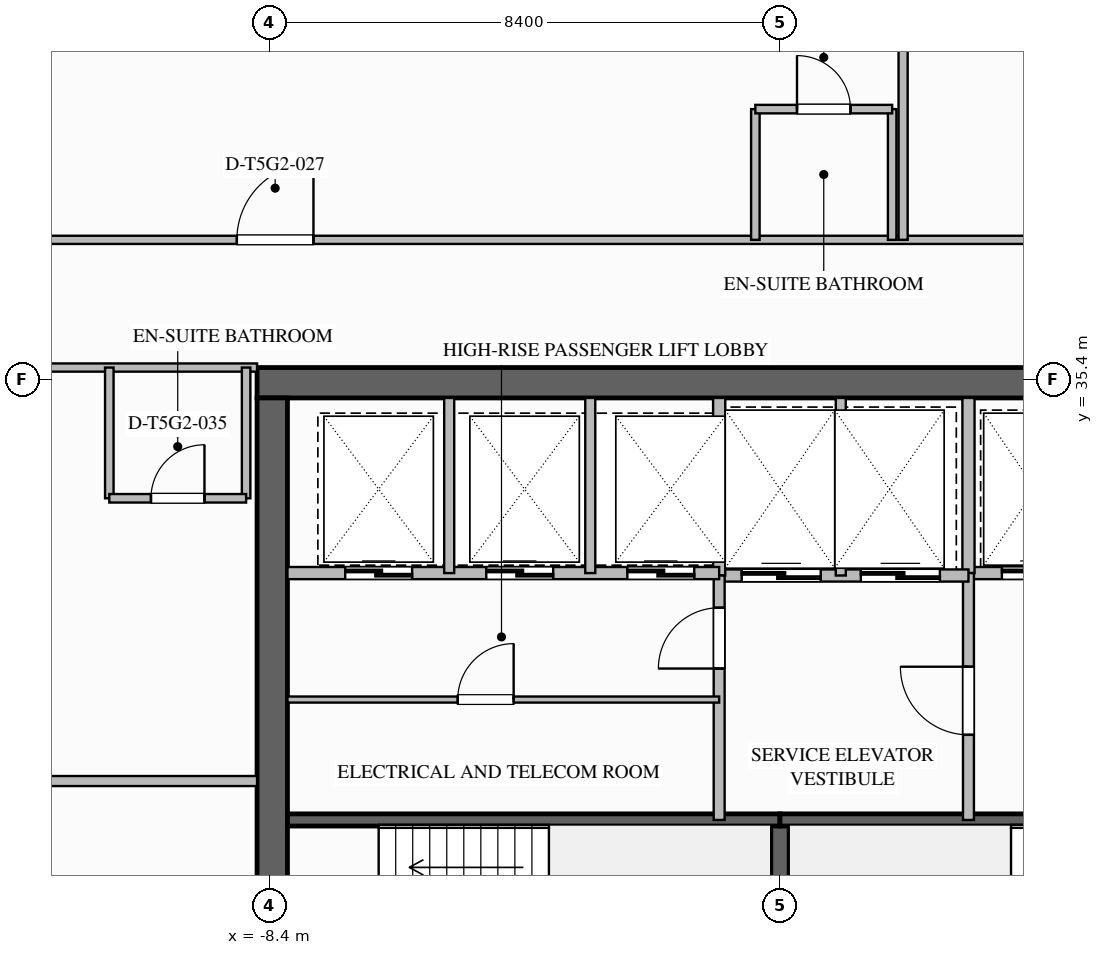
"""IFC4 building model, lengths in metres.
Left out: names, types, materials, properties, quantities, classifications, styles, units other than length and angle.
Written with IfcOpenShell. Run it as: python <this file> out.ifc"""

import sys

from ifc_helpers import new_model, si_unit, direction, frame, frame_2d, origin, place, context, subcontext, project, spatial, rectangle, extrude, element, fill, save


model = new_model("IFC4")
c1 = context("Model", 3, precision=1e-05, world=origin(), true_north=direction((0.0, 1.0)))
c2 = subcontext(c1, "Body", "Model", "MODEL_VIEW")
j1 = project(units=[si_unit("LENGTHUNIT", "METRE"), si_unit("PLANEANGLEUNIT", "RADIAN")], contexts=[c1])
p1 = place(None, origin())
s1 = spatial("IfcSite", under=j1, at=p1, CompositionType="ELEMENT")
p2 = place(p1, origin())
s2 = spatial("IfcBuilding", under=s1, at=p2, CompositionType="ELEMENT")
p3 = place(p2, frame((0.0, 0.0, 275.95)))
s3 = spatial("IfcBuildingStorey", under=s2, at=p3, CompositionType="ELEMENT", Elevation=275.95)
p4 = place(p3, frame((-8.6, 35.35, 0.0), z_axis=(0.0, 0.0, 1.0), x_axis=(1.0, 0.0, 0.0)))
e1 = element("IfcWall", 1, at=p4, inside=s3, PredefinedType="SHEAR", context=c2, shape_type="SweptSolid", body=[
    extrude(rectangle(XDim=17.2, YDim=0.5, at=frame_2d((8.6, 0.0))), origin(), (0.0, 0.0, 1.0), 3.65),
])
p5 = place(p3, frame((-8.35, 18.9, 0.0), z_axis=(0.0, 0.0, 1.0), x_axis=(0.0, 1.0, 0.0)))
e2 = element("IfcWall", 2, at=p5, inside=s3, PredefinedType="SHEAR", context=c2, shape_type="SweptSolid", body=[
    extrude(rectangle(XDim=16.2, YDim=0.5, at=frame_2d((8.1, 0.0))), origin(), (0.0, 0.0, 1.0), 3.65),
])
p6 = place(p3, frame((0.0, 25.04, 0.0), z_axis=(0.0, 0.0, 1.0), x_axis=(0.0, 1.0, 0.0)))
e3 = element("IfcWall", 3, at=p6, inside=s3, PredefinedType="SOLIDWALL", context=c2, shape_type="SweptSolid", body=[
    extrude(rectangle(XDim=3.12, YDim=0.3, at=frame_2d((1.56, 0.0))), origin(), (0.0, 0.0, 1.0), 3.39),
])
p7 = place(p3, frame((-8.1, 28.16, 0.0), z_axis=(0.0, 0.0, 1.0), x_axis=(1.0, 0.0, 0.0)))
e4 = element("IfcWall", 4, at=p7, inside=s3, PredefinedType="SOLIDWALL", context=c2, shape_type="SweptSolid", body=[
    extrude(rectangle(XDim=8.1, YDim=0.2, at=frame_2d((4.05, 0.0))), origin(), (0.0, 0.0, 1.0), 3.39),
])
p8 = place(p3, frame((8.1, 28.16, 0.0), z_axis=(0.0, 0.0, 1.0), x_axis=(-1.0, 0.0, 0.0)))
e5 = element("IfcWall", 5, at=p8, inside=s3, PredefinedType="SOLIDWALL", context=c2, shape_type="SweptSolid", body=[
    extrude(rectangle(XDim=8.1, YDim=0.2, at=frame_2d((4.05, 0.0))), origin(), (0.0, 0.0, 1.0), 3.39),
])
p9 = place(p8, frame((0.28, 0.0, 0.0)))
e6 = element("IfcOpeningElement", 6, at=p9, cuts=e5, PredefinedType="OPENING", context=c2, shape_type="SweptSolid", body=[
    extrude(rectangle(XDim=1.05, YDim=2.1, at=frame_2d((0.525, 1.05))), frame((0.0, 0.11, 0.0), z_axis=(0.0, -1.0, 0.0), x_axis=(1.0, 0.0, 0.0)), (0.0, 0.0, 1.0), 0.22),
])
p10 = place(p3, frame((3.1, 32.22, 0.0), z_axis=(0.0, 0.0, 1.0), x_axis=(1.0, 0.0, 0.0)))
e7 = element("IfcWall", 7, at=p10, inside=s3, PredefinedType="SOLIDWALL", context=c2, shape_type="SweptSolid", body=[
    extrude(rectangle(XDim=5.0, YDim=0.2, at=frame_2d((2.5, 0.0))), origin(), (0.0, 0.0, 1.0), 3.39),
])
p11 = place(p10, frame((0.55, 0.0, 0.0)))
e8 = element("IfcOpeningElement", 8, at=p11, cuts=e7, PredefinedType="OPENING", context=c2, shape_type="SweptSolid", body=[
    extrude(rectangle(XDim=1.2, YDim=2.2, at=frame_2d((0.6, 1.1))), frame((0.0, 0.11, 0.0), z_axis=(0.0, -1.0, 0.0), x_axis=(1.0, 0.0, 0.0)), (0.0, 0.0, 1.0), 0.22),
])
p12 = place(p10, frame((2.85, 0.0, 0.0)))
e9 = element("IfcOpeningElement", 9, at=p12, cuts=e7, PredefinedType="OPENING", context=c2, shape_type="SweptSolid", body=[
    extrude(rectangle(XDim=1.2, YDim=2.2, at=frame_2d((0.6, 1.1))), frame((0.0, 0.11, 0.0), z_axis=(0.0, -1.0, 0.0), x_axis=(1.0, 0.0, 0.0)), (0.0, 0.0, 1.0), 0.22),
])
p13 = place(p3, frame((3.1, 32.22, 0.0), z_axis=(0.0, 0.0, 1.0), x_axis=(0.0, 1.0, 0.0)))
e10 = element("IfcWall", 10, at=p13, inside=s3, PredefinedType="SOLIDWALL", context=c2, shape_type="SweptSolid", body=[
    extrude(rectangle(XDim=2.88, YDim=0.2, at=frame_2d((1.44, 0.0))), origin(), (0.0, 0.0, 1.0), 3.39),
])
p14 = place(p3, frame((3.1, 28.16, 0.0), z_axis=(0.0, 0.0, 1.0), x_axis=(0.0, 1.0, 0.0)))
e11 = element("IfcWall", 11, at=p14, inside=s3, PredefinedType="SOLIDWALL", context=c2, shape_type="SweptSolid", body=[
    extrude(rectangle(XDim=4.06, YDim=0.18, at=frame_2d((2.03, 0.0))), origin(), (0.0, 0.0, 1.0), 3.39),
])
p15 = place(p14, frame((1.4, 0.0, 0.0)))
e12 = element("IfcOpeningElement", 12, at=p15, cuts=e11, PredefinedType="OPENING", context=c2, shape_type="SweptSolid", body=[
    extrude(rectangle(XDim=1.12, YDim=2.1, at=frame_2d((0.56, 1.05))), frame((0.0, 0.1, 0.0), z_axis=(0.0, -1.0, 0.0), x_axis=(1.0, 0.0, 0.0)), (0.0, 0.0, 1.0), 0.2),
])
p16 = place(p3, frame((-1.0, 32.18, 0.0), z_axis=(0.0, 0.0, 1.0), x_axis=(1.0, 0.0, 0.0)))
e13 = element("IfcWall", 13, at=p16, inside=s3, PredefinedType="SOLIDWALL", context=c2, shape_type="SweptSolid", body=[
    extrude(rectangle(XDim=4.1, YDim=0.2, at=frame_2d((2.05, 0.0))), origin(), (0.0, 0.0, 1.0), 3.39),
])
p17 = place(p16, frame((0.37, 0.0, 0.0)))
e14 = element("IfcOpeningElement", 14, at=p17, cuts=e13, PredefinedType="OPENING", context=c2, shape_type="SweptSolid", body=[
    extrude(rectangle(XDim=1.3, YDim=2.2, at=frame_2d((0.65, 1.1))), frame((0.0, 0.11, 0.0), z_axis=(0.0, -1.0, 0.0), x_axis=(1.0, 0.0, 0.0)), (0.0, 0.0, 1.0), 0.22),
])
p18 = place(p16, frame((2.33, 0.0, 0.0)))
e15 = element("IfcOpeningElement", 15, at=p18, cuts=e13, PredefinedType="OPENING", context=c2, shape_type="SweptSolid", body=[
    extrude(rectangle(XDim=1.3, YDim=2.2, at=frame_2d((0.65, 1.1))), frame((0.0, 0.11, 0.0), z_axis=(0.0, -1.0, 0.0), x_axis=(1.0, 0.0, 0.0)), (0.0, 0.0, 1.0), 0.22),
])
p19 = place(p3, frame((-1.0, 32.18, 0.0), z_axis=(0.0, 0.0, 1.0), x_axis=(0.0, 1.0, 0.0)))
e16 = element("IfcWall", 16, at=p19, inside=s3, PredefinedType="SOLIDWALL", context=c2, shape_type="SweptSolid", body=[
    extrude(rectangle(XDim=2.92, YDim=0.2, at=frame_2d((1.46, 0.0))), origin(), (0.0, 0.0, 1.0), 3.39),
])
p20 = place(p3, frame((1.0, 32.18, 0.0), z_axis=(0.0, 0.0, 1.0), x_axis=(0.0, 1.0, 0.0)))
e17 = element("IfcWall", 17, at=p20, inside=s3, PredefinedType="PARTITIONING", context=c2, shape_type="SweptSolid", body=[
    extrude(rectangle(XDim=2.92, YDim=0.165, at=frame_2d((1.46, 0.0))), origin(), (0.0, 0.0, 1.0), 3.39),
])
p21 = place(p3, frame((-1.0, 28.16, 0.0), z_axis=(0.0, 0.0, 1.0), x_axis=(0.0, 1.0, 0.0)))
e18 = element("IfcWall", 18, at=p21, inside=s3, PredefinedType="SOLIDWALL", context=c2, shape_type="SweptSolid", body=[
    extrude(rectangle(XDim=4.02, YDim=0.18, at=frame_2d((2.01, 0.0))), origin(), (0.0, 0.0, 1.0), 3.39),
])
p22 = place(p21, frame((2.49, 0.0, 0.0)))
e19 = element("IfcOpeningElement", 19, at=p22, cuts=e18, PredefinedType="OPENING", context=c2, shape_type="SweptSolid", body=[
    extrude(rectangle(XDim=1.0, YDim=2.1, at=frame_2d((0.5, 1.05))), frame((0.0, 0.1, 0.0), z_axis=(0.0, -1.0, 0.0), x_axis=(1.0, 0.0, 0.0)), (0.0, 0.0, 1.0), 0.2),
])
p23 = place(p3, frame((-8.1, 32.22, 0.0), z_axis=(0.0, 0.0, 1.0), x_axis=(1.0, 0.0, 0.0)))
e20 = element("IfcWall", 20, at=p23, inside=s3, PredefinedType="SOLIDWALL", context=c2, shape_type="SweptSolid", body=[
    extrude(rectangle(XDim=7.1, YDim=0.2, at=frame_2d((3.55, 0.0))), origin(), (0.0, 0.0, 1.0), 3.39),
])
p24 = place(p23, frame((0.95, 0.0, 0.0)))
e21 = element("IfcOpeningElement", 21, at=p24, cuts=e20, PredefinedType="OPENING", context=c2, shape_type="SweptSolid", body=[
    extrude(rectangle(XDim=1.1, YDim=2.2, at=frame_2d((0.55, 1.1))), frame((0.0, 0.11, 0.0), z_axis=(0.0, -1.0, 0.0), x_axis=(1.0, 0.0, 0.0)), (0.0, 0.0, 1.0), 0.22),
])
p25 = place(p23, frame((3.27, 0.0, 0.0)))
e22 = element("IfcOpeningElement", 22, at=p25, cuts=e20, PredefinedType="OPENING", context=c2, shape_type="SweptSolid", body=[
    extrude(rectangle(XDim=1.1, YDim=2.2, at=frame_2d((0.55, 1.1))), frame((0.0, 0.11, 0.0), z_axis=(0.0, -1.0, 0.0), x_axis=(1.0, 0.0, 0.0)), (0.0, 0.0, 1.0), 0.22),
])
p26 = place(p23, frame((5.59, 0.0, 0.0)))
e23 = element("IfcOpeningElement", 23, at=p26, cuts=e20, PredefinedType="OPENING", context=c2, shape_type="SweptSolid", body=[
    extrude(rectangle(XDim=1.1, YDim=2.2, at=frame_2d((0.55, 1.1))), frame((0.0, 0.11, 0.0), z_axis=(0.0, -1.0, 0.0), x_axis=(1.0, 0.0, 0.0)), (0.0, 0.0, 1.0), 0.22),
])
for number, where, z_axis, x_axis in (
    (24, (-5.44, 32.22, 0.0), (0.0, 0.0, 1.0), (0.0, 1.0, 0.0)),
    (25, (-3.12, 32.22, 0.0), (0.0, 0.0, 1.0), (0.0, 1.0, 0.0)),
):
    element("IfcWall", number, at=place(p3, frame(where, z_axis=z_axis, x_axis=x_axis)), inside=s3, PredefinedType="PARTITIONING", context=c2, shape_type="SweptSolid", body=[
        extrude(rectangle(XDim=2.88, YDim=0.165, at=frame_2d((1.44, 0.0))), origin(), (0.0, 0.0, 1.0), 3.39),
    ])
p27 = place(p3, frame((-8.1, 30.14, 0.0), z_axis=(0.0, 0.0, 1.0), x_axis=(1.0, 0.0, 0.0)))
e26 = element("IfcWall", 26, at=p27, inside=s3, PredefinedType="PARTITIONING", context=c2, shape_type="SweptSolid", body=[
    extrude(rectangle(XDim=7.1, YDim=0.1, at=frame_2d((3.55, 0.0))), origin(), (0.0, 0.0, 1.0), 3.39),
])
p28 = place(p27, frame((2.8, 0.0, 0.0)))
e27 = element("IfcOpeningElement", 27, at=p28, cuts=e26, PredefinedType="OPENING", context=c2, shape_type="SweptSolid", body=[
    extrude(rectangle(XDim=0.92, YDim=2.1, at=frame_2d((0.46, 1.05))), frame((0.0, 0.06, 0.0), z_axis=(0.0, -1.0, 0.0), x_axis=(1.0, 0.0, 0.0)), (0.0, 0.0, 1.0), 0.12),
])
p29 = place(p3, frame((-16.2, 37.7, 0.0), z_axis=(0.0, 0.0, 1.0), x_axis=(1.0, 0.0, 0.0)))
e28 = element("IfcWall", 28, at=p29, inside=s3, PredefinedType="PARTITIONING", context=c2, shape_type="SweptSolid", body=[
    extrude(rectangle(XDim=38.28, YDim=0.135, at=frame_2d((19.14, 0.0))), origin(), (0.0, 0.0, 1.0), 3.39),
])
p30 = place(p29, frame((33.355, 0.0, 0.0)))
e29 = element("IfcOpeningElement", 29, at=p30, cuts=e28, PredefinedType="OPENING", context=c2, shape_type="SweptSolid", body=[
    extrude(rectangle(XDim=1.26, YDim=2.2, at=frame_2d((0.63, 1.1))), frame((0.0, 0.077, 0.0), z_axis=(0.0, -1.0, 0.0), x_axis=(1.0, 0.0, 0.0)), (0.0, 0.0, 1.0), 0.155),
])
p31 = place(p29, frame((7.268, 0.0, 0.0)))
e30 = element("IfcOpeningElement", 30, at=p31, cuts=e28, PredefinedType="OPENING", context=c2, shape_type="SweptSolid", body=[
    extrude(rectangle(XDim=1.26, YDim=2.2, at=frame_2d((0.63, 1.1))), frame((0.0, 0.077, 0.0), z_axis=(0.0, -1.0, 0.0), x_axis=(1.0, 0.0, 0.0)), (0.0, 0.0, 1.0), 0.155),
])
p32 = place(p29, frame((23.468, 0.0, 0.0)))
e31 = element("IfcOpeningElement", 31, at=p32, cuts=e28, PredefinedType="OPENING", context=c2, shape_type="SweptSolid", body=[
    extrude(rectangle(XDim=1.26, YDim=2.2, at=frame_2d((0.63, 1.1))), frame((0.0, 0.077, 0.0), z_axis=(0.0, -1.0, 0.0), x_axis=(1.0, 0.0, 0.0)), (0.0, 0.0, 1.0), 0.155),
])
p33 = place(p3, frame((-16.2, 35.6, 0.0), z_axis=(0.0, 0.0, 1.0), x_axis=(1.0, 0.0, 0.0)))
e32 = element("IfcWall", 32, at=p33, inside=s3, PredefinedType="PARTITIONING", context=c2, shape_type="SweptSolid", body=[
    extrude(rectangle(XDim=7.6, YDim=0.135, at=frame_2d((3.8, 0.0))), origin(), (0.0, 0.0, 1.0), 2.767),
])
p34 = place(p33, frame((2.155, 0.0, 0.0)))
e33 = element("IfcOpeningElement", 33, at=p34, cuts=e32, PredefinedType="OPENING", context=c2, shape_type="SweptSolid", body=[
    extrude(rectangle(XDim=1.26, YDim=2.2, at=frame_2d((0.63, 1.1))), frame((0.0, 0.077, 0.0), z_axis=(0.0, -1.0, 0.0), x_axis=(1.0, 0.0, 0.0)), (0.0, 0.0, 1.0), 0.155),
])
for number, where, z_axis, x_axis in (
    (34, (-0.405, 37.7, 0.0), (0.0, 0.0, 1.0), (0.0, 1.0, 0.0)),
    (35, (1.845, 37.7, 0.0), (0.0, 0.0, 1.0), (0.0, 1.0, 0.0)),
):
    element("IfcWall", number, at=place(p3, frame(where, z_axis=z_axis, x_axis=x_axis)), inside=s3, PredefinedType="PLUMBINGWALL", context=c2, shape_type="SweptSolid", body=[
        extrude(rectangle(XDim=2.15, YDim=0.14, at=frame_2d((1.075, 0.0))), origin(), (0.0, 0.0, 1.0), 3.39),
    ])
p35 = place(p3, frame((-0.405, 39.85, 0.0), z_axis=(0.0, 0.0, 1.0), x_axis=(1.0, 0.0, 0.0)))
e36 = element("IfcWall", 36, at=p35, inside=s3, PredefinedType="PLUMBINGWALL", context=c2, shape_type="SweptSolid", body=[
    extrude(rectangle(XDim=2.25, YDim=0.14, at=frame_2d((1.125, 0.0))), origin(), (0.0, 0.0, 1.0), 3.39),
])
p36 = place(p35, frame((0.685, 0.0, 0.0)))
e37 = element("IfcOpeningElement", 37, at=p36, cuts=e36, PredefinedType="OPENING", context=c2, shape_type="SweptSolid", body=[
    extrude(rectangle(XDim=0.88, YDim=2.1, at=frame_2d((0.44, 1.05))), frame((0.0, 0.08, 0.0), z_axis=(0.0, -1.0, 0.0), x_axis=(1.0, 0.0, 0.0)), (0.0, 0.0, 1.0), 0.16),
])
p37 = place(p3, frame((2.025, 37.7, 0.0), z_axis=(0.0, 0.0, 1.0), x_axis=(0.0, 1.0, 0.0)))
e38 = element("IfcWall", 38, at=p37, inside=s3, PredefinedType="PARTITIONING", context=c2, shape_type="SweptSolid", body=[
    extrude(rectangle(XDim=10.7, YDim=0.15, at=frame_2d((5.35, 0.0))), origin(), (0.0, 0.0, 1.0), 3.39),
])
p38 = place(p3, frame((-21.4, 28.8, 0.0), z_axis=(0.0, 0.0, 1.0), x_axis=(1.0, 0.0, 0.0)))
e39 = element("IfcWall", 39, at=p38, inside=s3, PredefinedType="PARTITIONING", context=c2, shape_type="SweptSolid", body=[
    extrude(rectangle(XDim=12.8, YDim=0.165, at=frame_2d((6.4, 0.0))), origin(), (0.0, 0.0, 1.0), 3.39),
])
for number, where, z_axis, x_axis in (
    (40, (-11.03, 35.6, 0.0), (0.0, 0.0, 1.0), (0.0, -1.0, 0.0)),
    (41, (-8.78, 35.6, 0.0), (0.0, 0.0, 1.0), (0.0, -1.0, 0.0)),
):
    element("IfcWall", number, at=place(p3, frame(where, z_axis=z_axis, x_axis=x_axis)), inside=s3, PredefinedType="PLUMBINGWALL", context=c2, shape_type="SweptSolid", body=[
        extrude(rectangle(XDim=2.15, YDim=0.14, at=frame_2d((1.075, 0.0))), origin(), (0.0, 0.0, 1.0), 3.39),
    ])
p39 = place(p3, frame((-11.03, 33.45, 0.0), z_axis=(0.0, 0.0, 1.0), x_axis=(1.0, 0.0, 0.0)))
e42 = element("IfcWall", 42, at=p39, inside=s3, PredefinedType="PLUMBINGWALL", context=c2, shape_type="SweptSolid", body=[
    extrude(rectangle(XDim=2.25, YDim=0.14, at=frame_2d((1.125, 0.0))), origin(), (0.0, 0.0, 1.0), 3.39),
])
p40 = place(p39, frame((0.685, 0.0, 0.0)))
e43 = element("IfcOpeningElement", 43, at=p40, cuts=e42, PredefinedType="OPENING", context=c2, shape_type="SweptSolid", body=[
    extrude(rectangle(XDim=0.88, YDim=2.1, at=frame_2d((0.44, 1.05))), frame((0.0, 0.08, 0.0), z_axis=(0.0, -1.0, 0.0), x_axis=(1.0, 0.0, 0.0)), (0.0, 0.0, 1.0), 0.16),
])
p41 = place(p11, origin())
e44 = element("IfcDoor", 44, at=p41, inside=s3, OperationType="SLIDING_TO_LEFT", PredefinedType="DOOR", context=c2, shape_type="SweptSolid", body=[
    extrude(rectangle(XDim=1.2, YDim=2.2, at=frame_2d((0.6, 1.1))), frame((0.0, 0.025, 0.0), z_axis=(0.0, -1.0, 0.0), x_axis=(1.0, 0.0, 0.0)), (0.0, 0.0, 1.0), 0.05),
])
fill(e8, e44)
p42 = place(p15, origin())
e45 = element("IfcDoor", 45, at=p42, inside=s3, OperationType="SINGLE_SWING_RIGHT", PredefinedType="DOOR", context=c2, shape_type="SweptSolid", body=[
    extrude(rectangle(XDim=1.12, YDim=2.1, at=frame_2d((0.56, 1.05))), frame((0.0, 0.025, 0.0), z_axis=(0.0, -1.0, 0.0), x_axis=(1.0, 0.0, 0.0)), (0.0, 0.0, 1.0), 0.05),
])
fill(e12, e45)
p43 = place(p17, origin())
e46 = element("IfcDoor", 46, at=p43, inside=s3, OperationType="SLIDING_TO_LEFT", PredefinedType="DOOR", context=c2, shape_type="SweptSolid", body=[
    extrude(rectangle(XDim=1.3, YDim=2.2, at=frame_2d((0.65, 1.1))), frame((0.0, 0.025, 0.0), z_axis=(0.0, -1.0, 0.0), x_axis=(1.0, 0.0, 0.0)), (0.0, 0.0, 1.0), 0.05),
])
fill(e14, e46)
p44 = place(p18, origin())
e47 = element("IfcDoor", 47, at=p44, inside=s3, OperationType="SLIDING_TO_LEFT", PredefinedType="DOOR", context=c2, shape_type="SweptSolid", body=[
    extrude(rectangle(XDim=1.3, YDim=2.2, at=frame_2d((0.65, 1.1))), frame((0.0, 0.025, 0.0), z_axis=(0.0, -1.0, 0.0), x_axis=(1.0, 0.0, 0.0)), (0.0, 0.0, 1.0), 0.05),
])
fill(e15, e47)
p45 = place(p22, origin())
e48 = element("IfcDoor", 48, at=p45, inside=s3, OperationType="SINGLE_SWING_LEFT", PredefinedType="DOOR", context=c2, shape_type="SweptSolid", body=[
    extrude(rectangle(XDim=1.0, YDim=2.1, at=frame_2d((0.5, 1.05))), frame((0.0, 0.025, 0.0), z_axis=(0.0, -1.0, 0.0), x_axis=(1.0, 0.0, 0.0)), (0.0, 0.0, 1.0), 0.05),
])
fill(e19, e48)
p46 = place(p24, origin())
e49 = element("IfcDoor", 49, at=p46, inside=s3, OperationType="SLIDING_TO_LEFT", PredefinedType="DOOR", context=c2, shape_type="SweptSolid", body=[
    extrude(rectangle(XDim=1.1, YDim=2.2, at=frame_2d((0.55, 1.1))), frame((0.0, 0.025, 0.0), z_axis=(0.0, -1.0, 0.0), x_axis=(1.0, 0.0, 0.0)), (0.0, 0.0, 1.0), 0.05),
])
fill(e21, e49)
p47 = place(p25, origin())
e50 = element("IfcDoor", 50, at=p47, inside=s3, OperationType="SLIDING_TO_LEFT", PredefinedType="DOOR", context=c2, shape_type="SweptSolid", body=[
    extrude(rectangle(XDim=1.1, YDim=2.2, at=frame_2d((0.55, 1.1))), frame((0.0, 0.025, 0.0), z_axis=(0.0, -1.0, 0.0), x_axis=(1.0, 0.0, 0.0)), (0.0, 0.0, 1.0), 0.05),
])
fill(e22, e50)
p48 = place(p26, origin())
e51 = element("IfcDoor", 51, at=p48, inside=s3, OperationType="SLIDING_TO_LEFT", PredefinedType="DOOR", context=c2, shape_type="SweptSolid", body=[
    extrude(rectangle(XDim=1.1, YDim=2.2, at=frame_2d((0.55, 1.1))), frame((0.0, 0.025, 0.0), z_axis=(0.0, -1.0, 0.0), x_axis=(1.0, 0.0, 0.0)), (0.0, 0.0, 1.0), 0.05),
])
fill(e23, e51)
p49 = place(p28, origin())
e52 = element("IfcDoor", 52, at=p49, inside=s3, OperationType="SINGLE_SWING_RIGHT", PredefinedType="DOOR", context=c2, shape_type="SweptSolid", body=[
    extrude(rectangle(XDim=0.92, YDim=2.1, at=frame_2d((0.46, 1.05))), frame((0.0, 0.025, 0.0), z_axis=(0.0, -1.0, 0.0), x_axis=(1.0, 0.0, 0.0)), (0.0, 0.0, 1.0), 0.05),
])
fill(e27, e52)
p50 = place(p36, origin())
e53 = element("IfcDoor", 53, at=p50, inside=s3, OperationType="SINGLE_SWING_LEFT", PredefinedType="DOOR", context=c2, shape_type="SweptSolid", body=[
    extrude(rectangle(XDim=0.88, YDim=2.1, at=frame_2d((0.44, 1.05))), frame((0.0, 0.025, 0.0), z_axis=(0.0, -1.0, 0.0), x_axis=(1.0, 0.0, 0.0)), (0.0, 0.0, 1.0), 0.05),
])
fill(e37, e53)
p51 = place(p31, origin())
e54 = element("IfcDoor", 54, at=p51, inside=s3, OperationType="SINGLE_SWING_RIGHT", PredefinedType="DOOR", context=c2, shape_type="SweptSolid", body=[
    extrude(rectangle(XDim=1.26, YDim=2.2, at=frame_2d((0.63, 1.1))), frame((0.0, 0.025, 0.0), z_axis=(0.0, -1.0, 0.0), x_axis=(1.0, 0.0, 0.0)), (0.0, 0.0, 1.0), 0.05),
])
fill(e30, e54)
p52 = place(p40, origin())
e55 = element("IfcDoor", 55, at=p52, inside=s3, OperationType="SINGLE_SWING_RIGHT", PredefinedType="DOOR", context=c2, shape_type="SweptSolid", body=[
    extrude(rectangle(XDim=0.88, YDim=2.1, at=frame_2d((0.44, 1.05))), frame((0.0, 0.025, 0.0), z_axis=(0.0, -1.0, 0.0), x_axis=(1.0, 0.0, 0.0)), (0.0, 0.0, 1.0), 0.05),
])
fill(e43, e55)
save(model, sys.argv[1])
